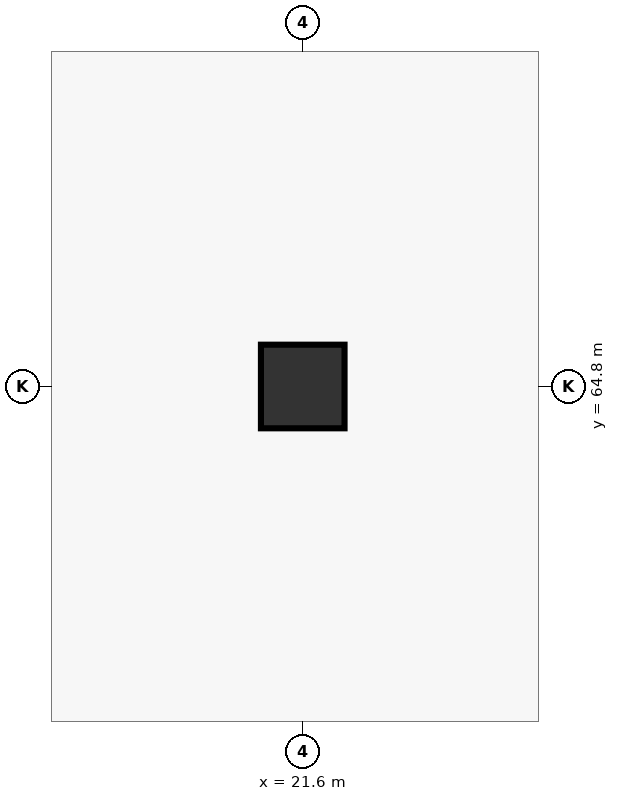
"""IFC4 building model, lengths in metres.
Left out: names, types, materials, properties, quantities, classifications, styles, units other than length and angle.
Written with IfcOpenShell. Run it as: python <this file> out.ifc"""

import sys

from ifc_helpers import new_model, si_unit, direction, frame, origin, origin_2d, place, context, subcontext, project, spatial, rectangle, extrude, element, save


model = new_model("IFC4")
c1 = context("Model", 3, precision=1e-05, world=origin(), true_north=direction((0.0, 1.0)))
c2 = subcontext(c1, "Body", "Model", "MODEL_VIEW")
j1 = project(units=[si_unit("LENGTHUNIT", "METRE"), si_unit("PLANEANGLEUNIT", "RADIAN")], contexts=[c1])
p1 = place(None, origin())
s1 = spatial("IfcSite", under=j1, at=p1, CompositionType="ELEMENT")
p2 = place(p1, origin())
s2 = spatial("IfcBuilding", under=s1, at=p2, CompositionType="ELEMENT")
p3 = place(p2, frame((0.0, 0.0, -5.4)))
s3 = spatial("IfcBuildingStorey", under=s2, at=p3, CompositionType="ELEMENT", Elevation=-5.4)
p4 = place(p3, frame((21.6, 64.8, 0.0), z_axis=(0.0, 0.0, 1.0), x_axis=(1.0, 0.0, 0.0)))
e1 = element("IfcColumn", 1, at=p4, inside=s3, PredefinedType="COLUMN", context=c2, shape_type="SweptSolid", body=[
    extrude(rectangle(XDim=1.1, YDim=1.1, at=origin_2d()), origin(), (0.0, 0.0, 1.0), 5.4),
])
save(model, sys.argv[1])
